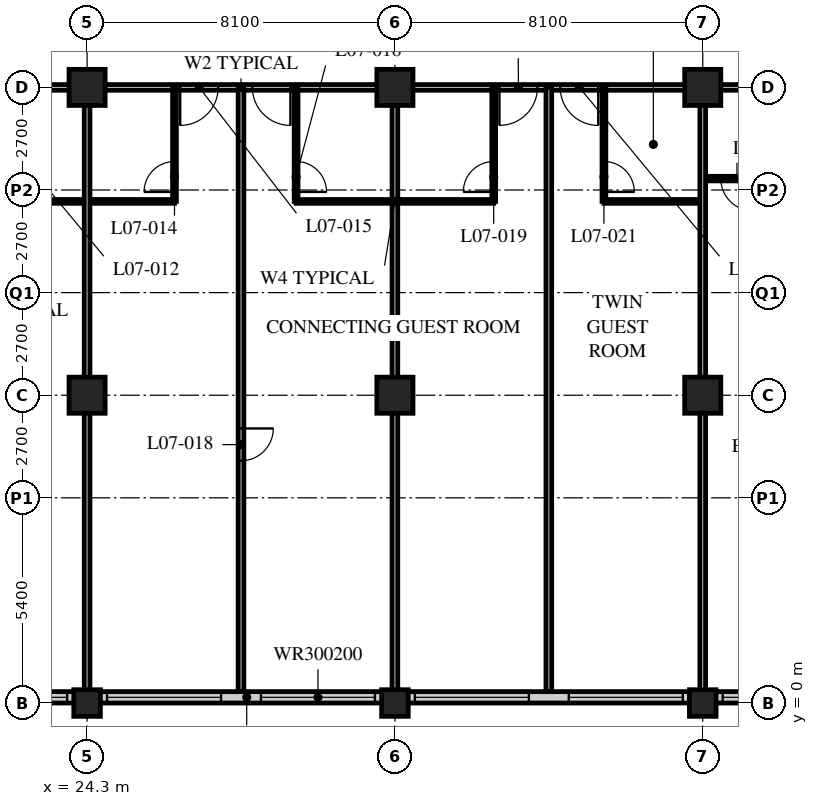
"""IFC4 building model, lengths in metres.
Left out: names, types, materials, properties, quantities, classifications, styles, units other than length and angle.
Written with IfcOpenShell. Run it as: python <this file> out.ifc"""

import sys

from ifc_helpers import new_model, si_unit, direction, frame, frame_2d, origin, origin_2d, place, context, subcontext, project, spatial, rectangle, hollow_rectangle, extrude, element, fill, save


model = new_model("IFC4")
c1 = context("Model", 3, precision=1e-05, world=origin(), true_north=direction((0.0, 1.0)))
c2 = subcontext(c1, "Body", "Model", "MODEL_VIEW")
j1 = project(units=[si_unit("LENGTHUNIT", "METRE"), si_unit("PLANEANGLEUNIT", "RADIAN")], contexts=[c1])
p1 = place(None, origin())
s1 = spatial("IfcSite", under=j1, at=p1, CompositionType="ELEMENT")
p2 = place(p1, origin())
s2 = spatial("IfcBuilding", under=s1, at=p2, CompositionType="ELEMENT")
p3 = place(p2, frame((0.0, 0.0, 36.4)))
s3 = spatial("IfcBuildingStorey", under=s2, at=p3, CompositionType="ELEMENT", Elevation=36.4)
p4 = place(p3, frame((24.3, 0.0, 0.0), z_axis=(0.0, 0.0, 1.0), x_axis=(1.0, 0.0, 0.0)))
e1 = element("IfcColumn", 1, at=p4, inside=s3, PredefinedType="COLUMN", context=c2, shape_type="SweptSolid", body=[
    extrude(hollow_rectangle(XDim=0.7, YDim=0.7, WallThickness=0.06, at=origin_2d()), origin(), (0.0, 0.0, 1.0), 3.4),
])
for number, where, z_axis, x_axis in (
    (2, (24.3, 8.1, 0.0), (0.0, 0.0, 1.0), (1.0, 0.0, 0.0)),
    (3, (24.3, 16.2, 0.0), (0.0, 0.0, 1.0), (1.0, 0.0, 0.0)),
):
    element("IfcColumn", number, at=place(p3, frame(where, z_axis=z_axis, x_axis=x_axis)), inside=s3, PredefinedType="COLUMN", context=c2, shape_type="SweptSolid", body=[
        extrude(hollow_rectangle(XDim=0.95, YDim=0.95, WallThickness=0.095, at=origin_2d()), origin(), (0.0, 0.0, 1.0), 3.4),
    ])
p5 = place(p3, frame((32.4, 0.0, 0.0), z_axis=(0.0, 0.0, 1.0), x_axis=(1.0, 0.0, 0.0)))
e4 = element("IfcColumn", 4, at=p5, inside=s3, PredefinedType="COLUMN", context=c2, shape_type="SweptSolid", body=[
    extrude(hollow_rectangle(XDim=0.7, YDim=0.7, WallThickness=0.06, at=origin_2d()), origin(), (0.0, 0.0, 1.0), 3.4),
])
for number, where, z_axis, x_axis in (
    (5, (32.4, 8.1, 0.0), (0.0, 0.0, 1.0), (1.0, 0.0, 0.0)),
    (6, (32.4, 16.2, 0.0), (0.0, 0.0, 1.0), (1.0, 0.0, 0.0)),
):
    element("IfcColumn", number, at=place(p3, frame(where, z_axis=z_axis, x_axis=x_axis)), inside=s3, PredefinedType="COLUMN", context=c2, shape_type="SweptSolid", body=[
        extrude(hollow_rectangle(XDim=0.95, YDim=0.95, WallThickness=0.095, at=origin_2d()), origin(), (0.0, 0.0, 1.0), 3.4),
    ])
p6 = place(p3, frame((40.5, 0.0, 0.0), z_axis=(0.0, 0.0, 1.0), x_axis=(1.0, 0.0, 0.0)))
e7 = element("IfcColumn", 7, at=p6, inside=s3, PredefinedType="COLUMN", context=c2, shape_type="SweptSolid", body=[
    extrude(hollow_rectangle(XDim=0.7, YDim=0.7, WallThickness=0.06, at=origin_2d()), origin(), (0.0, 0.0, 1.0), 3.4),
])
for number, where, z_axis, x_axis in (
    (8, (40.5, 8.1, 0.0), (0.0, 0.0, 1.0), (1.0, 0.0, 0.0)),
    (9, (40.5, 16.2, 0.0), (0.0, 0.0, 1.0), (1.0, 0.0, 0.0)),
):
    element("IfcColumn", number, at=place(p3, frame(where, z_axis=z_axis, x_axis=x_axis)), inside=s3, PredefinedType="COLUMN", context=c2, shape_type="SweptSolid", body=[
        extrude(hollow_rectangle(XDim=0.95, YDim=0.95, WallThickness=0.095, at=origin_2d()), origin(), (0.0, 0.0, 1.0), 3.4),
    ])
p7 = place(p3, frame((8.4, 0.15, 0.0), z_axis=(0.0, 0.0, 1.0), x_axis=(1.0, 0.0, 0.0)))
e10 = element("IfcWall", 10, at=p7, inside=s3, PredefinedType="SOLIDWALL", context=c2, shape_type="SweptSolid", body=[
    extrude(rectangle(XDim=40.2, YDim=0.3, at=frame_2d((20.1, 0.0))), origin(), (0.0, 0.0, 1.0), 3.19),
])
p8 = place(p7, frame((0.225, 0.0, 0.9)))
e11 = element("IfcOpeningElement", 11, at=p8, cuts=e10, PredefinedType="OPENING", context=c2, shape_type="SweptSolid", body=[
    extrude(rectangle(XDim=3.0, YDim=2.0, at=frame_2d((1.5, 1.0))), frame((0.0, 0.16, 0.0), z_axis=(0.0, -1.0, 0.0), x_axis=(1.0, 0.0, 0.0)), (0.0, 0.0, 1.0), 0.32),
])
p9 = place(p7, frame((4.275, 0.0, 0.9)))
e12 = element("IfcOpeningElement", 12, at=p9, cuts=e10, PredefinedType="OPENING", context=c2, shape_type="SweptSolid", body=[
    extrude(rectangle(XDim=3.0, YDim=2.0, at=frame_2d((1.5, 1.0))), frame((0.0, 0.16, 0.0), z_axis=(0.0, -1.0, 0.0), x_axis=(1.0, 0.0, 0.0)), (0.0, 0.0, 1.0), 0.32),
])
p10 = place(p7, frame((8.325, 0.0, 0.9)))
e13 = element("IfcOpeningElement", 13, at=p10, cuts=e10, PredefinedType="OPENING", context=c2, shape_type="SweptSolid", body=[
    extrude(rectangle(XDim=3.0, YDim=2.0, at=frame_2d((1.5, 1.0))), frame((0.0, 0.16, 0.0), z_axis=(0.0, -1.0, 0.0), x_axis=(1.0, 0.0, 0.0)), (0.0, 0.0, 1.0), 0.32),
])
p11 = place(p7, frame((12.375, 0.0, 0.9)))
e14 = element("IfcOpeningElement", 14, at=p11, cuts=e10, PredefinedType="OPENING", context=c2, shape_type="SweptSolid", body=[
    extrude(rectangle(XDim=3.0, YDim=2.0, at=frame_2d((1.5, 1.0))), frame((0.0, 0.16, 0.0), z_axis=(0.0, -1.0, 0.0), x_axis=(1.0, 0.0, 0.0)), (0.0, 0.0, 1.0), 0.32),
])
p12 = place(p7, frame((16.425, 0.0, 0.9)))
e15 = element("IfcOpeningElement", 15, at=p12, cuts=e10, PredefinedType="OPENING", context=c2, shape_type="SweptSolid", body=[
    extrude(rectangle(XDim=3.0, YDim=2.0, at=frame_2d((1.5, 1.0))), frame((0.0, 0.16, 0.0), z_axis=(0.0, -1.0, 0.0), x_axis=(1.0, 0.0, 0.0)), (0.0, 0.0, 1.0), 0.32),
])
p13 = place(p7, frame((20.475, 0.0, 0.9)))
e16 = element("IfcOpeningElement", 16, at=p13, cuts=e10, PredefinedType="OPENING", context=c2, shape_type="SweptSolid", body=[
    extrude(rectangle(XDim=3.0, YDim=2.0, at=frame_2d((1.5, 1.0))), frame((0.0, 0.16, 0.0), z_axis=(0.0, -1.0, 0.0), x_axis=(1.0, 0.0, 0.0)), (0.0, 0.0, 1.0), 0.32),
])
p14 = place(p7, frame((24.525, 0.0, 0.9)))
e17 = element("IfcOpeningElement", 17, at=p14, cuts=e10, PredefinedType="OPENING", context=c2, shape_type="SweptSolid", body=[
    extrude(rectangle(XDim=3.0, YDim=2.0, at=frame_2d((1.5, 1.0))), frame((0.0, 0.16, 0.0), z_axis=(0.0, -1.0, 0.0), x_axis=(1.0, 0.0, 0.0)), (0.0, 0.0, 1.0), 0.32),
])
p15 = place(p7, frame((28.575, 0.0, 0.9)))
e18 = element("IfcOpeningElement", 18, at=p15, cuts=e10, PredefinedType="OPENING", context=c2, shape_type="SweptSolid", body=[
    extrude(rectangle(XDim=3.0, YDim=2.0, at=frame_2d((1.5, 1.0))), frame((0.0, 0.16, 0.0), z_axis=(0.0, -1.0, 0.0), x_axis=(1.0, 0.0, 0.0)), (0.0, 0.0, 1.0), 0.32),
])
p16 = place(p7, frame((32.625, 0.0, 0.9)))
e19 = element("IfcOpeningElement", 19, at=p16, cuts=e10, PredefinedType="OPENING", context=c2, shape_type="SweptSolid", body=[
    extrude(rectangle(XDim=3.0, YDim=2.0, at=frame_2d((1.5, 1.0))), frame((0.0, 0.16, 0.0), z_axis=(0.0, -1.0, 0.0), x_axis=(1.0, 0.0, 0.0)), (0.0, 0.0, 1.0), 0.32),
])
p17 = place(p7, frame((36.675, 0.0, 0.9)))
e20 = element("IfcOpeningElement", 20, at=p17, cuts=e10, PredefinedType="OPENING", context=c2, shape_type="SweptSolid", body=[
    extrude(rectangle(XDim=3.0, YDim=2.0, at=frame_2d((1.5, 1.0))), frame((0.0, 0.16, 0.0), z_axis=(0.0, -1.0, 0.0), x_axis=(1.0, 0.0, 0.0)), (0.0, 0.0, 1.0), 0.32),
])
p18 = place(p3, frame((12.15, 16.2, 0.0), z_axis=(0.0, 0.0, 1.0), x_axis=(1.0, 0.0, 0.0)))
e21 = element("IfcWall", 21, at=p18, inside=s3, PredefinedType="PARTITIONING", context=c2, shape_type="SweptSolid", body=[
    extrude(rectangle(XDim=32.4, YDim=0.15, at=frame_2d((16.2, 0.0))), origin(), (0.0, 0.0, 1.0), 2.578),
])
p19 = place(p18, frame((6.5, 0.0, 0.0)))
e22 = element("IfcOpeningElement", 22, at=p19, cuts=e21, PredefinedType="OPENING", context=c2, shape_type="SweptSolid", body=[
    extrude(rectangle(XDim=1.0, YDim=2.1, at=frame_2d((0.5, 1.05))), frame((0.0, 0.085, 0.0), z_axis=(0.0, -1.0, 0.0), x_axis=(1.0, 0.0, 0.0)), (0.0, 0.0, 1.0), 0.17),
])
p20 = place(p18, frame((8.4, 0.0, 0.0)))
e23 = element("IfcOpeningElement", 23, at=p20, cuts=e21, PredefinedType="OPENING", context=c2, shape_type="SweptSolid", body=[
    extrude(rectangle(XDim=1.0, YDim=2.1, at=frame_2d((0.5, 1.05))), frame((0.0, 0.085, 0.0), z_axis=(0.0, -1.0, 0.0), x_axis=(1.0, 0.0, 0.0)), (0.0, 0.0, 1.0), 0.17),
])
p21 = place(p18, frame((14.6, 0.0, 0.0)))
e24 = element("IfcOpeningElement", 24, at=p21, cuts=e21, PredefinedType="OPENING", context=c2, shape_type="SweptSolid", body=[
    extrude(rectangle(XDim=1.0, YDim=2.1, at=frame_2d((0.5, 1.05))), frame((0.0, 0.085, 0.0), z_axis=(0.0, -1.0, 0.0), x_axis=(1.0, 0.0, 0.0)), (0.0, 0.0, 1.0), 0.17),
])
p22 = place(p18, frame((16.5, 0.0, 0.0)))
e25 = element("IfcOpeningElement", 25, at=p22, cuts=e21, PredefinedType="OPENING", context=c2, shape_type="SweptSolid", body=[
    extrude(rectangle(XDim=1.0, YDim=2.1, at=frame_2d((0.5, 1.05))), frame((0.0, 0.085, 0.0), z_axis=(0.0, -1.0, 0.0), x_axis=(1.0, 0.0, 0.0)), (0.0, 0.0, 1.0), 0.17),
])
p23 = place(p18, frame((23.0, 0.0, 0.0)))
e26 = element("IfcOpeningElement", 26, at=p23, cuts=e21, PredefinedType="OPENING", context=c2, shape_type="SweptSolid", body=[
    extrude(rectangle(XDim=1.0, YDim=2.1, at=frame_2d((0.5, 1.05))), frame((0.0, 0.085, 0.0), z_axis=(0.0, -1.0, 0.0), x_axis=(1.0, 0.0, 0.0)), (0.0, 0.0, 1.0), 0.17),
])
p24 = place(p18, frame((24.6, 0.0, 0.0)))
e27 = element("IfcOpeningElement", 27, at=p24, cuts=e21, PredefinedType="OPENING", context=c2, shape_type="SweptSolid", body=[
    extrude(rectangle(XDim=1.0, YDim=2.1, at=frame_2d((0.5, 1.05))), frame((0.0, 0.085, 0.0), z_axis=(0.0, -1.0, 0.0), x_axis=(1.0, 0.0, 0.0)), (0.0, 0.0, 1.0), 0.17),
])
p25 = place(p18, frame((1.525, 0.0, 0.0)))
e28 = element("IfcOpeningElement", 28, at=p25, cuts=e21, PredefinedType="OPENING", context=c2, shape_type="SweptSolid", body=[
    extrude(rectangle(XDim=1.0, YDim=2.1, at=frame_2d((0.5, 1.05))), frame((0.0, 0.085, 0.0), z_axis=(0.0, -1.0, 0.0), x_axis=(1.0, 0.0, 0.0)), (0.0, 0.0, 1.0), 0.17),
])
p26 = place(p18, frame((29.875, 0.0, 0.0)))
e29 = element("IfcOpeningElement", 29, at=p26, cuts=e21, PredefinedType="OPENING", context=c2, shape_type="SweptSolid", body=[
    extrude(rectangle(XDim=1.0, YDim=2.1, at=frame_2d((0.5, 1.05))), frame((0.0, 0.085, 0.0), z_axis=(0.0, -1.0, 0.0), x_axis=(1.0, 0.0, 0.0)), (0.0, 0.0, 1.0), 0.17),
])
p27 = place(p3, frame((21.7, 13.2, 0.0), z_axis=(0.0, 0.0, 1.0), x_axis=(1.0, 0.0, 0.0)))
e30 = element("IfcWall", 30, at=p27, inside=s3, PredefinedType="PARTITIONING", context=c2, shape_type="SweptSolid", body=[
    extrude(rectangle(XDim=4.9, YDim=0.1, at=frame_2d((2.45, 0.0))), origin(), (0.0, 0.0, 1.0), 3.19),
])
p28 = place(p3, frame((24.3, 16.2, 0.0), z_axis=(0.0, 0.0, 1.0), x_axis=(0.0, -1.0, 0.0)))
e31 = element("IfcWall", 31, at=p28, inside=s3, PredefinedType="PARTITIONING", context=c2, shape_type="SweptSolid", body=[
    extrude(rectangle(XDim=15.9, YDim=0.15, at=frame_2d((7.95, 0.0))), origin(), (0.0, 0.0, 1.0), 2.578),
])
p29 = place(p3, frame((26.6, 16.2, 0.0), z_axis=(0.0, 0.0, 1.0), x_axis=(0.0, -1.0, 0.0)))
e32 = element("IfcWall", 32, at=p29, inside=s3, PredefinedType="PARTITIONING", context=c2, shape_type="SweptSolid", body=[
    extrude(rectangle(XDim=3.0, YDim=0.1, at=frame_2d((1.5, 0.0))), origin(), (0.0, 0.0, 1.0), 3.19),
])
p30 = place(p29, frame((1.95, 0.0, 0.0)))
e33 = element("IfcOpeningElement", 33, at=p30, cuts=e32, PredefinedType="OPENING", context=c2, shape_type="SweptSolid", body=[
    extrude(rectangle(XDim=0.8, YDim=2.1, at=frame_2d((0.4, 1.05))), frame((0.0, 0.06, 0.0), z_axis=(0.0, -1.0, 0.0), x_axis=(1.0, 0.0, 0.0)), (0.0, 0.0, 1.0), 0.12),
])
p31 = place(p3, frame((29.8, 13.2, 0.0), z_axis=(0.0, 0.0, 1.0), x_axis=(1.0, 0.0, 0.0)))
e34 = element("IfcWall", 34, at=p31, inside=s3, PredefinedType="PARTITIONING", context=c2, shape_type="SweptSolid", body=[
    extrude(rectangle(XDim=5.2, YDim=0.1, at=frame_2d((2.6, 0.0))), origin(), (0.0, 0.0, 1.0), 3.19),
])
p32 = place(p3, frame((29.8, 16.2, 0.0), z_axis=(0.0, 0.0, 1.0), x_axis=(0.0, -1.0, 0.0)))
e35 = element("IfcWall", 35, at=p32, inside=s3, PredefinedType="PARTITIONING", context=c2, shape_type="SweptSolid", body=[
    extrude(rectangle(XDim=3.0, YDim=0.1, at=frame_2d((1.5, 0.0))), origin(), (0.0, 0.0, 1.0), 3.19),
])
p33 = place(p32, frame((1.95, 0.0, 0.0)))
e36 = element("IfcOpeningElement", 36, at=p33, cuts=e35, PredefinedType="OPENING", context=c2, shape_type="SweptSolid", body=[
    extrude(rectangle(XDim=0.8, YDim=2.1, at=frame_2d((0.4, 1.05))), frame((0.0, 0.06, 0.0), z_axis=(0.0, -1.0, 0.0), x_axis=(1.0, 0.0, 0.0)), (0.0, 0.0, 1.0), 0.12),
])
p34 = place(p3, frame((28.35, 16.2, 0.0), z_axis=(0.0, 0.0, 1.0), x_axis=(0.0, -1.0, 0.0)))
e37 = element("IfcWall", 37, at=p34, inside=s3, PredefinedType="PARTITIONING", context=c2, shape_type="SweptSolid", body=[
    extrude(rectangle(XDim=15.9, YDim=0.15, at=frame_2d((7.95, 0.0))), origin(), (0.0, 0.0, 1.0), 3.19),
])
p35 = place(p34, frame((8.975, 0.0, 0.0)))
e38 = element("IfcOpeningElement", 38, at=p35, cuts=e37, PredefinedType="OPENING", context=c2, shape_type="SweptSolid", body=[
    extrude(rectangle(XDim=0.85, YDim=2.1, at=frame_2d((0.425, 1.05))), frame((0.0, 0.085, 0.0), z_axis=(0.0, -1.0, 0.0), x_axis=(1.0, 0.0, 0.0)), (0.0, 0.0, 1.0), 0.17),
])
p36 = place(p3, frame((32.4, 16.2, 0.0), z_axis=(0.0, 0.0, 1.0), x_axis=(0.0, -1.0, 0.0)))
e39 = element("IfcWall", 39, at=p36, inside=s3, PredefinedType="PARTITIONING", context=c2, shape_type="SweptSolid", body=[
    extrude(rectangle(XDim=15.9, YDim=0.15, at=frame_2d((7.95, 0.0))), origin(), (0.0, 0.0, 1.0), 2.578),
])
p37 = place(p3, frame((35.0, 16.2, 0.0), z_axis=(0.0, 0.0, 1.0), x_axis=(0.0, -1.0, 0.0)))
e40 = element("IfcWall", 40, at=p37, inside=s3, PredefinedType="PARTITIONING", context=c2, shape_type="SweptSolid", body=[
    extrude(rectangle(XDim=3.0, YDim=0.1, at=frame_2d((1.5, 0.0))), origin(), (0.0, 0.0, 1.0), 3.19),
])
p38 = place(p37, frame((1.95, 0.0, 0.0)))
e41 = element("IfcOpeningElement", 41, at=p38, cuts=e40, PredefinedType="OPENING", context=c2, shape_type="SweptSolid", body=[
    extrude(rectangle(XDim=0.8, YDim=2.1, at=frame_2d((0.4, 1.05))), frame((0.0, 0.06, 0.0), z_axis=(0.0, -1.0, 0.0), x_axis=(1.0, 0.0, 0.0)), (0.0, 0.0, 1.0), 0.12),
])
p39 = place(p3, frame((36.45, 16.2, 0.0), z_axis=(0.0, 0.0, 1.0), x_axis=(0.0, -1.0, 0.0)))
e42 = element("IfcWall", 42, at=p39, inside=s3, PredefinedType="PARTITIONING", context=c2, shape_type="SweptSolid", body=[
    extrude(rectangle(XDim=15.9, YDim=0.15, at=frame_2d((7.95, 0.0))), origin(), (0.0, 0.0, 1.0), 3.19),
])
p40 = place(p3, frame((37.9, 13.2, 0.0), z_axis=(0.0, 0.0, 1.0), x_axis=(1.0, 0.0, 0.0)))
e43 = element("IfcWall", 43, at=p40, inside=s3, PredefinedType="PARTITIONING", context=c2, shape_type="SweptSolid", body=[
    extrude(rectangle(XDim=2.6, YDim=0.1, at=frame_2d((1.3, 0.0))), origin(), (0.0, 0.0, 1.0), 3.19),
])
p41 = place(p3, frame((37.9, 16.2, 0.0), z_axis=(0.0, 0.0, 1.0), x_axis=(0.0, -1.0, 0.0)))
e44 = element("IfcWall", 44, at=p41, inside=s3, PredefinedType="PARTITIONING", context=c2, shape_type="SweptSolid", body=[
    extrude(rectangle(XDim=3.0, YDim=0.1, at=frame_2d((1.5, 0.0))), origin(), (0.0, 0.0, 1.0), 3.19),
])
p42 = place(p41, frame((1.95, 0.0, 0.0)))
e45 = element("IfcOpeningElement", 45, at=p42, cuts=e44, PredefinedType="OPENING", context=c2, shape_type="SweptSolid", body=[
    extrude(rectangle(XDim=0.8, YDim=2.1, at=frame_2d((0.4, 1.05))), frame((0.0, 0.06, 0.0), z_axis=(0.0, -1.0, 0.0), x_axis=(1.0, 0.0, 0.0)), (0.0, 0.0, 1.0), 0.12),
])
p43 = place(p3, frame((40.5, 13.8, 0.0), z_axis=(0.0, 0.0, 1.0), x_axis=(1.0, 0.0, 0.0)))
e46 = element("IfcWall", 46, at=p43, inside=s3, PredefinedType="PARTITIONING", context=c2, shape_type="SweptSolid", body=[
    extrude(rectangle(XDim=8.05, YDim=0.12, at=frame_2d((4.025, 0.0))), origin(), (0.0, 0.0, 1.0), 3.19),
])
p44 = place(p43, frame((0.475, 0.0, 0.0)))
e47 = element("IfcOpeningElement", 47, at=p44, cuts=e46, PredefinedType="OPENING", context=c2, shape_type="SweptSolid", body=[
    extrude(rectangle(XDim=0.85, YDim=2.1, at=frame_2d((0.425, 1.05))), frame((0.0, 0.07, 0.0), z_axis=(0.0, -1.0, 0.0), x_axis=(1.0, 0.0, 0.0)), (0.0, 0.0, 1.0), 0.14),
])
p45 = place(p43, frame((4.325, 0.0, 0.0)))
e48 = element("IfcOpeningElement", 48, at=p45, cuts=e46, PredefinedType="OPENING", context=c2, shape_type="SweptSolid", body=[
    extrude(rectangle(XDim=0.85, YDim=2.1, at=frame_2d((0.425, 1.05))), frame((0.0, 0.07, 0.0), z_axis=(0.0, -1.0, 0.0), x_axis=(1.0, 0.0, 0.0)), (0.0, 0.0, 1.0), 0.14),
])
p46 = place(p3, frame((40.5, 16.2, 0.0), z_axis=(0.0, 0.0, 1.0), x_axis=(0.0, -1.0, 0.0)))
e49 = element("IfcWall", 49, at=p46, inside=s3, PredefinedType="PARTITIONING", context=c2, shape_type="SweptSolid", body=[
    extrude(rectangle(XDim=15.9, YDim=0.15, at=frame_2d((7.95, 0.0))), origin(), (0.0, 0.0, 1.0), 2.578),
])
p47 = place(p11, origin())
e50 = element("IfcWindow", 50, at=p47, inside=s3, PartitioningType="SINGLE_PANEL", PredefinedType="WINDOW", context=c2, shape_type="SweptSolid", body=[
    extrude(rectangle(XDim=3.0, YDim=2.0, at=frame_2d((1.5, 1.0))), frame((0.0, 0.03, 0.0), z_axis=(0.0, -1.0, 0.0), x_axis=(1.0, 0.0, 0.0)), (0.0, 0.0, 1.0), 0.06),
])
fill(e14, e50)
p48 = place(p12, origin())
e51 = element("IfcWindow", 51, at=p48, inside=s3, PartitioningType="SINGLE_PANEL", PredefinedType="WINDOW", context=c2, shape_type="SweptSolid", body=[
    extrude(rectangle(XDim=3.0, YDim=2.0, at=frame_2d((1.5, 1.0))), frame((0.0, 0.03, 0.0), z_axis=(0.0, -1.0, 0.0), x_axis=(1.0, 0.0, 0.0)), (0.0, 0.0, 1.0), 0.06),
])
fill(e15, e51)
p49 = place(p13, origin())
e52 = element("IfcWindow", 52, at=p49, inside=s3, PartitioningType="SINGLE_PANEL", PredefinedType="WINDOW", context=c2, shape_type="SweptSolid", body=[
    extrude(rectangle(XDim=3.0, YDim=2.0, at=frame_2d((1.5, 1.0))), frame((0.0, 0.03, 0.0), z_axis=(0.0, -1.0, 0.0), x_axis=(1.0, 0.0, 0.0)), (0.0, 0.0, 1.0), 0.06),
])
fill(e16, e52)
p50 = place(p14, origin())
e53 = element("IfcWindow", 53, at=p50, inside=s3, PartitioningType="SINGLE_PANEL", PredefinedType="WINDOW", context=c2, shape_type="SweptSolid", body=[
    extrude(rectangle(XDim=3.0, YDim=2.0, at=frame_2d((1.5, 1.0))), frame((0.0, 0.03, 0.0), z_axis=(0.0, -1.0, 0.0), x_axis=(1.0, 0.0, 0.0)), (0.0, 0.0, 1.0), 0.06),
])
fill(e17, e53)
p51 = place(p15, origin())
e54 = element("IfcWindow", 54, at=p51, inside=s3, PartitioningType="SINGLE_PANEL", PredefinedType="WINDOW", context=c2, shape_type="SweptSolid", body=[
    extrude(rectangle(XDim=3.0, YDim=2.0, at=frame_2d((1.5, 1.0))), frame((0.0, 0.03, 0.0), z_axis=(0.0, -1.0, 0.0), x_axis=(1.0, 0.0, 0.0)), (0.0, 0.0, 1.0), 0.06),
])
fill(e18, e54)
p52 = place(p16, origin())
e55 = element("IfcWindow", 55, at=p52, inside=s3, PartitioningType="SINGLE_PANEL", PredefinedType="WINDOW", context=c2, shape_type="SweptSolid", body=[
    extrude(rectangle(XDim=3.0, YDim=2.0, at=frame_2d((1.5, 1.0))), frame((0.0, 0.03, 0.0), z_axis=(0.0, -1.0, 0.0), x_axis=(1.0, 0.0, 0.0)), (0.0, 0.0, 1.0), 0.06),
])
fill(e19, e55)
p53 = place(p30, origin())
e56 = element("IfcDoor", 56, at=p53, inside=s3, OperationType="SINGLE_SWING_LEFT", PredefinedType="DOOR", context=c2, shape_type="SweptSolid", body=[
    extrude(rectangle(XDim=0.8, YDim=2.1, at=frame_2d((0.4, 1.05))), frame((0.0, 0.025, 0.0), z_axis=(0.0, -1.0, 0.0), x_axis=(1.0, 0.0, 0.0)), (0.0, 0.0, 1.0), 0.05),
])
fill(e33, e56)
p54 = place(p21, origin())
e57 = element("IfcDoor", 57, at=p54, inside=s3, OperationType="SINGLE_SWING_RIGHT", PredefinedType="DOOR", context=c2, shape_type="SweptSolid", body=[
    extrude(rectangle(XDim=1.0, YDim=2.1, at=frame_2d((0.5, 1.05))), frame((0.0, 0.025, 0.0), z_axis=(0.0, -1.0, 0.0), x_axis=(1.0, 0.0, 0.0)), (0.0, 0.0, 1.0), 0.05),
])
fill(e24, e57)
p55 = place(p33, origin())
e58 = element("IfcDoor", 58, at=p55, inside=s3, OperationType="SINGLE_SWING_RIGHT", PredefinedType="DOOR", context=c2, shape_type="SweptSolid", body=[
    extrude(rectangle(XDim=0.8, YDim=2.1, at=frame_2d((0.4, 1.05))), frame((0.0, 0.025, 0.0), z_axis=(0.0, -1.0, 0.0), x_axis=(1.0, 0.0, 0.0)), (0.0, 0.0, 1.0), 0.05),
])
fill(e36, e58)
p56 = place(p22, origin())
e59 = element("IfcDoor", 59, at=p56, inside=s3, OperationType="SINGLE_SWING_LEFT", PredefinedType="DOOR", context=c2, shape_type="SweptSolid", body=[
    extrude(rectangle(XDim=1.0, YDim=2.1, at=frame_2d((0.5, 1.05))), frame((0.0, 0.025, 0.0), z_axis=(0.0, -1.0, 0.0), x_axis=(1.0, 0.0, 0.0)), (0.0, 0.0, 1.0), 0.05),
])
fill(e25, e59)
p57 = place(p35, origin())
e60 = element("IfcDoor", 60, at=p57, inside=s3, OperationType="SINGLE_SWING_LEFT", PredefinedType="DOOR", context=c2, shape_type="SweptSolid", body=[
    extrude(rectangle(XDim=0.85, YDim=2.1, at=frame_2d((0.425, 1.05))), frame((0.0, 0.025, 0.0), z_axis=(0.0, -1.0, 0.0), x_axis=(1.0, 0.0, 0.0)), (0.0, 0.0, 1.0), 0.05),
])
fill(e38, e60)
p58 = place(p38, origin())
e61 = element("IfcDoor", 61, at=p58, inside=s3, OperationType="SINGLE_SWING_LEFT", PredefinedType="DOOR", context=c2, shape_type="SweptSolid", body=[
    extrude(rectangle(XDim=0.8, YDim=2.1, at=frame_2d((0.4, 1.05))), frame((0.0, 0.025, 0.0), z_axis=(0.0, -1.0, 0.0), x_axis=(1.0, 0.0, 0.0)), (0.0, 0.0, 1.0), 0.05),
])
fill(e41, e61)
p59 = place(p23, origin())
e62 = element("IfcDoor", 62, at=p59, inside=s3, OperationType="SINGLE_SWING_RIGHT", PredefinedType="DOOR", context=c2, shape_type="SweptSolid", body=[
    extrude(rectangle(XDim=1.0, YDim=2.1, at=frame_2d((0.5, 1.05))), frame((0.0, 0.025, 0.0), z_axis=(0.0, -1.0, 0.0), x_axis=(1.0, 0.0, 0.0)), (0.0, 0.0, 1.0), 0.05),
])
fill(e26, e62)
p60 = place(p42, origin())
e63 = element("IfcDoor", 63, at=p60, inside=s3, OperationType="SINGLE_SWING_RIGHT", PredefinedType="DOOR", context=c2, shape_type="SweptSolid", body=[
    extrude(rectangle(XDim=0.8, YDim=2.1, at=frame_2d((0.4, 1.05))), frame((0.0, 0.025, 0.0), z_axis=(0.0, -1.0, 0.0), x_axis=(1.0, 0.0, 0.0)), (0.0, 0.0, 1.0), 0.05),
])
fill(e45, e63)
p61 = place(p24, origin())
e64 = element("IfcDoor", 64, at=p61, inside=s3, OperationType="SINGLE_SWING_LEFT", PredefinedType="DOOR", context=c2, shape_type="SweptSolid", body=[
    extrude(rectangle(XDim=1.0, YDim=2.1, at=frame_2d((0.5, 1.05))), frame((0.0, 0.025, 0.0), z_axis=(0.0, -1.0, 0.0), x_axis=(1.0, 0.0, 0.0)), (0.0, 0.0, 1.0), 0.05),
])
fill(e27, e64)
p62 = place(p44, origin())
e65 = element("IfcDoor", 65, at=p62, inside=s3, OperationType="SINGLE_SWING_LEFT", PredefinedType="DOOR", context=c2, shape_type="SweptSolid", body=[
    extrude(rectangle(XDim=0.85, YDim=2.1, at=frame_2d((0.425, 1.05))), frame((0.0, 0.025, 0.0), z_axis=(0.0, -1.0, 0.0), x_axis=(1.0, 0.0, 0.0)), (0.0, 0.0, 1.0), 0.05),
])
fill(e47, e65)
save(model, sys.argv[1])
